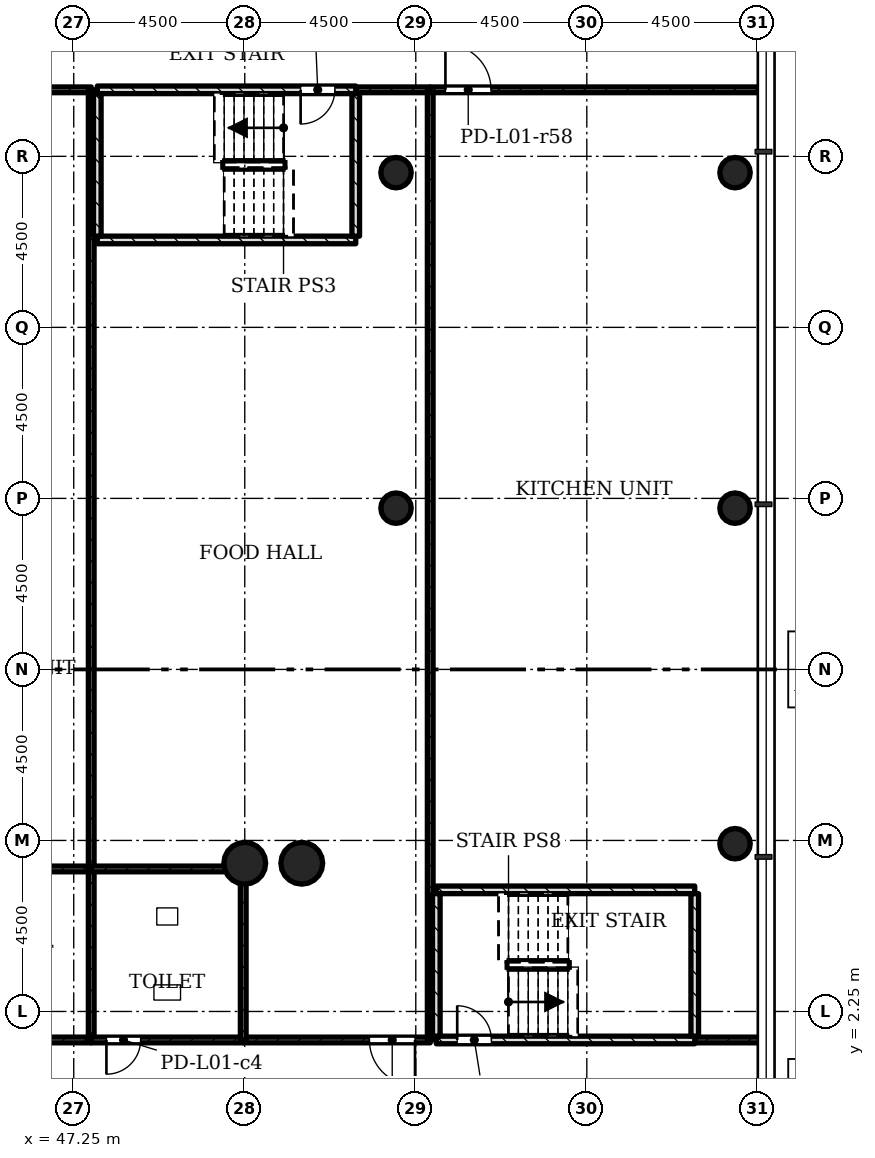
"""IFC4 building model, lengths in metres.
Left out: names, types, materials, properties, quantities, classifications, styles, units other than length and angle.
Written with IfcOpenShell. Run it as: python <this file> out.ifc"""

import sys

from ifc_helpers import new_model, si_unit, direction, frame, frame_2d, origin, origin_2d, place, context, subcontext, project, spatial, rectangle, hollow_circle, extrude, element, fill, save


model = new_model("IFC4")
c1 = context("Model", 3, precision=1e-05, world=origin(), true_north=direction((0.0, 1.0)))
c2 = subcontext(c1, "Body", "Model", "MODEL_VIEW")
j1 = project(units=[si_unit("LENGTHUNIT", "METRE"), si_unit("PLANEANGLEUNIT", "RADIAN")], contexts=[c1])
p1 = place(None, origin())
s1 = spatial("IfcSite", under=j1, at=p1, CompositionType="ELEMENT")
p2 = place(p1, origin())
s2 = spatial("IfcBuilding", under=s1, at=p2, CompositionType="ELEMENT")
p3 = place(p2, frame((0.0, 0.0, 6.0)))
s3 = spatial("IfcBuildingStorey", under=s2, at=p3, CompositionType="ELEMENT", Elevation=6.0)
for number, where, z_axis, x_axis in (
    (1, (51.75, 6.15, 0.0), (0.0, 0.0, 1.0), (1.0, 0.0, 0.0)),
    (2, (53.25, 6.15, 0.0), (0.0, 0.0, 1.0), (1.0, 0.0, 0.0)),
):
    element("IfcColumn", number, at=place(p3, frame(where, z_axis=z_axis, x_axis=x_axis)), inside=s3, PredefinedType="COLUMN", context=c2, shape_type="SweptSolid", body=[
        extrude(hollow_circle(Radius=0.55, WallThickness=0.04, at=origin_2d()), origin(), (0.0, 0.0, 1.0), 5.0),
    ])
for number, where, z_axis, x_axis in (
    (3, (64.65, 6.664, 0.0), (0.0, 0.0, 1.0), (1.0, 0.0, 0.0)),
    (4, (55.73, 15.493, 0.0), (0.0, 0.0, 1.0), (1.0, 0.0, 0.0)),
    (5, (64.65, 15.493, 0.0), (0.0, 0.0, 1.0), (1.0, 0.0, 0.0)),
    (6, (55.73, 24.321, 0.0), (0.0, 0.0, 1.0), (1.0, 0.0, 0.0)),
    (7, (64.65, 24.321, 0.0), (0.0, 0.0, 1.0), (1.0, 0.0, 0.0)),
):
    element("IfcColumn", number, at=place(p3, frame(where, z_axis=z_axis, x_axis=x_axis)), inside=s3, PredefinedType="COLUMN", context=c2, shape_type="SweptSolid", body=[
        extrude(hollow_circle(Radius=0.4, WallThickness=0.028, at=origin_2d()), origin(), (0.0, 0.0, 1.0), 5.0),
    ])
p4 = place(p3, frame((38.79, 26.5, 0.0), z_axis=(0.0, 0.0, 1.0), x_axis=(1.0, 0.0, 0.0)))
e8 = element("IfcWall", 8, at=p4, inside=s3, PredefinedType="PARTITIONING", context=c2, shape_type="SweptSolid", body=[
    extrude(rectangle(XDim=8.92, YDim=0.15, at=frame_2d((4.46, 0.0))), origin(), (0.0, 0.0, 1.0), 4.58),
])
p5 = place(p4, frame((0.4, 0.0, 0.0)))
e9 = element("IfcOpeningElement", 9, at=p5, cuts=e8, PredefinedType="OPENING", context=c2, shape_type="SweptSolid", body=[
    extrude(rectangle(XDim=1.2, YDim=2.1, at=frame_2d((0.6, 1.05))), frame((0.0, 0.085, 0.0), z_axis=(0.0, -1.0, 0.0), x_axis=(1.0, 0.0, 0.0)), (0.0, 0.0, 1.0), 0.17),
])
p6 = place(p3, frame((47.71, 26.5, 0.0), z_axis=(0.0, 0.0, 1.0), x_axis=(0.0, -1.0, 0.0)))
e10 = element("IfcWall", 10, at=p6, inside=s3, PredefinedType="PARTITIONING", context=c2, shape_type="SweptSolid", body=[
    extrude(rectangle(XDim=20.5, YDim=0.15, at=frame_2d((10.25, 0.0))), origin(), (0.0, 0.0, 1.0), 4.58),
])
p7 = place(p3, frame((54.67, 26.5, 0.0), z_axis=(0.0, 0.0, 1.0), x_axis=(1.0, 0.0, 0.0)))
e11 = element("IfcWall", 11, at=p7, inside=s3, PredefinedType="PARTITIONING", context=c2, shape_type="SweptSolid", body=[
    extrude(rectangle(XDim=1.96, YDim=0.15, at=frame_2d((0.98, 0.0))), origin(), (0.0, 0.0, 1.0), 4.58),
])
p8 = place(p3, frame((56.63, 1.5, 0.0), z_axis=(0.0, 0.0, 1.0), x_axis=(-1.0, 0.0, 0.0)))
e12 = element("IfcWall", 12, at=p8, inside=s3, PredefinedType="PARTITIONING", context=c2, shape_type="SweptSolid", body=[
    extrude(rectangle(XDim=4.92, YDim=0.15, at=frame_2d((2.46, 0.0))), origin(), (0.0, 0.0, 1.0), 4.58),
])
p9 = place(p8, frame((0.4, 0.0, 0.0)))
e13 = element("IfcOpeningElement", 13, at=p9, cuts=e12, PredefinedType="OPENING", context=c2, shape_type="SweptSolid", body=[
    extrude(rectangle(XDim=1.2, YDim=2.1, at=frame_2d((0.6, 1.05))), frame((0.0, 0.085, 0.0), z_axis=(0.0, -1.0, 0.0), x_axis=(1.0, 0.0, 0.0)), (0.0, 0.0, 1.0), 0.17),
])
p10 = place(p3, frame((56.63, 26.5, 0.0), z_axis=(0.0, 0.0, 1.0), x_axis=(0.0, -1.0, 0.0)))
e14 = element("IfcWall", 14, at=p10, inside=s3, PredefinedType="PARTITIONING", context=c2, shape_type="SweptSolid", body=[
    extrude(rectangle(XDim=25.0, YDim=0.15, at=frame_2d((12.5, 0.0))), origin(), (0.0, 0.0, 1.0), 4.58),
])
p11 = place(p3, frame((56.63, 26.5, 0.0), z_axis=(0.0, 0.0, 1.0), x_axis=(1.0, 0.0, 0.0)))
e15 = element("IfcWall", 15, at=p11, inside=s3, PredefinedType="PARTITIONING", context=c2, shape_type="SweptSolid", body=[
    extrude(rectangle(XDim=8.72, YDim=0.15, at=frame_2d((4.36, 0.0))), origin(), (0.0, 0.0, 1.0), 4.58),
])
p12 = place(p11, frame((0.4, 0.0, 0.0)))
e16 = element("IfcOpeningElement", 16, at=p12, cuts=e15, PredefinedType="OPENING", context=c2, shape_type="SweptSolid", body=[
    extrude(rectangle(XDim=1.2, YDim=2.1, at=frame_2d((0.6, 1.05))), frame((0.0, 0.085, 0.0), z_axis=(0.0, -1.0, 0.0), x_axis=(1.0, 0.0, 0.0)), (0.0, 0.0, 1.0), 0.17),
])
p13 = place(p3, frame((65.35, 1.5, 0.0), z_axis=(0.0, 0.0, 1.0), x_axis=(-1.0, 0.0, 0.0)))
e17 = element("IfcWall", 17, at=p13, inside=s3, PredefinedType="PARTITIONING", context=c2, shape_type="SweptSolid", body=[
    extrude(rectangle(XDim=1.76, YDim=0.15, at=frame_2d((0.88, 0.0))), origin(), (0.0, 0.0, 1.0), 4.58),
])
p14 = place(p3, frame((43.71, 1.5, 0.0), z_axis=(0.0, 0.0, 1.0), x_axis=(1.0, 0.0, 0.0)))
e18 = element("IfcWall", 18, at=p14, inside=s3, PredefinedType="PARTITIONING", context=c2, shape_type="SweptSolid", body=[
    extrude(rectangle(XDim=4.0, YDim=0.15, at=frame_2d((2.0, 0.0))), origin(), (0.0, 0.0, 1.0), 4.58),
])
p15 = place(p14, frame((0.4, 0.0, 0.0)))
e19 = element("IfcOpeningElement", 19, at=p15, cuts=e18, PredefinedType="OPENING", context=c2, shape_type="SweptSolid", body=[
    extrude(rectangle(XDim=0.9, YDim=2.1, at=frame_2d((0.45, 1.05))), frame((0.0, 0.085, 0.0), z_axis=(0.0, -1.0, 0.0), x_axis=(1.0, 0.0, 0.0)), (0.0, 0.0, 1.0), 0.17),
])
p16 = place(p3, frame((47.71, 6.0, 0.0), z_axis=(0.0, 0.0, 1.0), x_axis=(-1.0, 0.0, 0.0)))
e20 = element("IfcWall", 20, at=p16, inside=s3, PredefinedType="PARTITIONING", context=c2, shape_type="SweptSolid", body=[
    extrude(rectangle(XDim=4.0, YDim=0.15, at=frame_2d((2.0, 0.0))), origin(), (0.0, 0.0, 1.0), 4.58),
])
p17 = place(p3, frame((47.71, 1.5, 0.0), z_axis=(0.0, 0.0, 1.0), x_axis=(0.0, 1.0, 0.0)))
e21 = element("IfcWall", 21, at=p17, inside=s3, PredefinedType="PARTITIONING", context=c2, shape_type="SweptSolid", body=[
    extrude(rectangle(XDim=4.5, YDim=0.15, at=frame_2d((2.25, 0.0))), origin(), (0.0, 0.0, 1.0), 4.58),
])
p18 = place(p3, frame((47.71, 1.5, 0.0), z_axis=(0.0, 0.0, 1.0), x_axis=(1.0, 0.0, 0.0)))
e22 = element("IfcWall", 22, at=p18, inside=s3, PredefinedType="PARTITIONING", context=c2, shape_type="SweptSolid", body=[
    extrude(rectangle(XDim=4.0, YDim=0.15, at=frame_2d((2.0, 0.0))), origin(), (0.0, 0.0, 1.0), 4.58),
])
p19 = place(p18, frame((0.4, 0.0, 0.0)))
e23 = element("IfcOpeningElement", 23, at=p19, cuts=e22, PredefinedType="OPENING", context=c2, shape_type="SweptSolid", body=[
    extrude(rectangle(XDim=0.9, YDim=2.1, at=frame_2d((0.45, 1.05))), frame((0.0, 0.085, 0.0), z_axis=(0.0, -1.0, 0.0), x_axis=(1.0, 0.0, 0.0)), (0.0, 0.0, 1.0), 0.17),
])
p20 = place(p3, frame((51.71, 1.5, 0.0), z_axis=(0.0, 0.0, 1.0), x_axis=(0.0, 1.0, 0.0)))
e24 = element("IfcWall", 24, at=p20, inside=s3, PredefinedType="PARTITIONING", context=c2, shape_type="SweptSolid", body=[
    extrude(rectangle(XDim=4.5, YDim=0.15, at=frame_2d((2.25, 0.0))), origin(), (0.0, 0.0, 1.0), 4.58),
])
p21 = place(p3, frame((51.71, 6.0, 0.0), z_axis=(0.0, 0.0, 1.0), x_axis=(-1.0, 0.0, 0.0)))
e25 = element("IfcWall", 25, at=p21, inside=s3, PredefinedType="PARTITIONING", context=c2, shape_type="SweptSolid", body=[
    extrude(rectangle(XDim=4.0, YDim=0.15, at=frame_2d((2.0, 0.0))), origin(), (0.0, 0.0, 1.0), 4.58),
])
p22 = place(p3, frame((47.87, 26.5, 0.0), z_axis=(0.0, 0.0, 1.0), x_axis=(1.0, 0.0, 0.0)))
e26 = element("IfcWall", 26, at=p22, inside=s3, PredefinedType="SHEAR", context=c2, shape_type="SweptSolid", body=[
    extrude(rectangle(XDim=6.8, YDim=0.2, at=frame_2d((3.4, 0.0))), origin(), (0.0, 0.0, 1.0), 4.58),
])
p23 = place(p22, frame((5.35, 0.0, 0.0)))
e27 = element("IfcOpeningElement", 27, at=p23, cuts=e26, PredefinedType="OPENING", context=c2, shape_type="SweptSolid", body=[
    extrude(rectangle(XDim=0.9, YDim=2.1, at=frame_2d((0.45, 1.05))), frame((0.0, 0.11, 0.0), z_axis=(0.0, -1.0, 0.0), x_axis=(1.0, 0.0, 0.0)), (0.0, 0.0, 1.0), 0.22),
])
p24 = place(p3, frame((47.87, 22.55, 0.0), z_axis=(0.0, 0.0, 1.0), x_axis=(1.0, 0.0, 0.0)))
e28 = element("IfcWall", 28, at=p24, inside=s3, PredefinedType="SHEAR", context=c2, shape_type="SweptSolid", body=[
    extrude(rectangle(XDim=6.8, YDim=0.2, at=frame_2d((3.4, 0.0))), origin(), (0.0, 0.0, 1.0), 4.58),
])
for number, where, z_axis, x_axis in (
    (29, (47.87, 22.65, 0.0), (0.0, 0.0, 1.0), (0.0, 1.0, 0.0)),
    (30, (54.67, 22.65, 0.0), (0.0, 0.0, 1.0), (0.0, 1.0, 0.0)),
):
    element("IfcWall", number, at=place(p3, frame(where, z_axis=z_axis, x_axis=x_axis)), inside=s3, PredefinedType="SHEAR", context=c2, shape_type="SweptSolid", body=[
        extrude(rectangle(XDim=3.75, YDim=0.2, at=frame_2d((1.875, 0.0))), origin(), (0.0, 0.0, 1.0), 4.58),
    ])
p25 = place(p3, frame((56.79, 1.5, 0.0), z_axis=(0.0, 0.0, 1.0), x_axis=(1.0, 0.0, 0.0)))
e31 = element("IfcWall", 31, at=p25, inside=s3, PredefinedType="SHEAR", context=c2, shape_type="SweptSolid", body=[
    extrude(rectangle(XDim=6.8, YDim=0.2, at=frame_2d((3.4, 0.0))), origin(), (0.0, 0.0, 1.0), 4.58),
])
p26 = place(p25, frame((0.55, 0.0, 0.0)))
e32 = element("IfcOpeningElement", 32, at=p26, cuts=e31, PredefinedType="OPENING", context=c2, shape_type="SweptSolid", body=[
    extrude(rectangle(XDim=0.9, YDim=2.1, at=frame_2d((0.45, 1.05))), frame((0.0, 0.11, 0.0), z_axis=(0.0, -1.0, 0.0), x_axis=(1.0, 0.0, 0.0)), (0.0, 0.0, 1.0), 0.22),
])
p27 = place(p3, frame((56.79, 5.45, 0.0), z_axis=(0.0, 0.0, 1.0), x_axis=(1.0, 0.0, 0.0)))
e33 = element("IfcWall", 33, at=p27, inside=s3, PredefinedType="SHEAR", context=c2, shape_type="SweptSolid", body=[
    extrude(rectangle(XDim=6.8, YDim=0.2, at=frame_2d((3.4, 0.0))), origin(), (0.0, 0.0, 1.0), 4.58),
])
for number, where, z_axis, x_axis in (
    (34, (56.79, 1.6, 0.0), (0.0, 0.0, 1.0), (0.0, 1.0, 0.0)),
    (35, (63.59, 1.6, 0.0), (0.0, 0.0, 1.0), (0.0, 1.0, 0.0)),
):
    element("IfcWall", number, at=place(p3, frame(where, z_axis=z_axis, x_axis=x_axis)), inside=s3, PredefinedType="SHEAR", context=c2, shape_type="SweptSolid", body=[
        extrude(rectangle(XDim=3.75, YDim=0.2, at=frame_2d((1.875, 0.0))), origin(), (0.0, 0.0, 1.0), 4.58),
    ])
p28 = place(p9, origin())
e36 = element("IfcDoor", 36, at=p28, inside=s3, OperationType="SINGLE_SWING_RIGHT", PredefinedType="DOOR", context=c2, shape_type="SweptSolid", body=[
    extrude(rectangle(XDim=1.2, YDim=2.1, at=frame_2d((0.6, 1.05))), frame((0.0, 0.025, 0.0), z_axis=(0.0, -1.0, 0.0), x_axis=(1.0, 0.0, 0.0)), (0.0, 0.0, 1.0), 0.05),
])
fill(e13, e36)
p29 = place(p12, origin())
e37 = element("IfcDoor", 37, at=p29, inside=s3, OperationType="SINGLE_SWING_RIGHT", PredefinedType="DOOR", context=c2, shape_type="SweptSolid", body=[
    extrude(rectangle(XDim=1.2, YDim=2.1, at=frame_2d((0.6, 1.05))), frame((0.0, 0.025, 0.0), z_axis=(0.0, -1.0, 0.0), x_axis=(1.0, 0.0, 0.0)), (0.0, 0.0, 1.0), 0.05),
])
fill(e16, e37)
p30 = place(p19, origin())
e38 = element("IfcDoor", 38, at=p30, inside=s3, OperationType="SINGLE_SWING_LEFT", PredefinedType="DOOR", context=c2, shape_type="SweptSolid", body=[
    extrude(rectangle(XDim=0.9, YDim=2.1, at=frame_2d((0.45, 1.05))), frame((0.0, 0.025, 0.0), z_axis=(0.0, -1.0, 0.0), x_axis=(1.0, 0.0, 0.0)), (0.0, 0.0, 1.0), 0.05),
])
fill(e23, e38)
p31 = place(p23, origin())
e39 = element("IfcDoor", 39, at=p31, inside=s3, OperationType="SINGLE_SWING_LEFT", PredefinedType="DOOR", context=c2, shape_type="SweptSolid", body=[
    extrude(rectangle(XDim=0.9, YDim=2.1, at=frame_2d((0.45, 1.05))), frame((0.0, 0.025, 0.0), z_axis=(0.0, -1.0, 0.0), x_axis=(1.0, 0.0, 0.0)), (0.0, 0.0, 1.0), 0.05),
])
fill(e27, e39)
p32 = place(p26, origin())
e40 = element("IfcDoor", 40, at=p32, inside=s3, OperationType="SINGLE_SWING_RIGHT", PredefinedType="DOOR", context=c2, shape_type="SweptSolid", body=[
    extrude(rectangle(XDim=0.9, YDim=2.1, at=frame_2d((0.45, 1.05))), frame((0.0, 0.025, 0.0), z_axis=(0.0, -1.0, 0.0), x_axis=(1.0, 0.0, 0.0)), (0.0, 0.0, 1.0), 0.05),
])
fill(e32, e40)
save(model, sys.argv[1])
